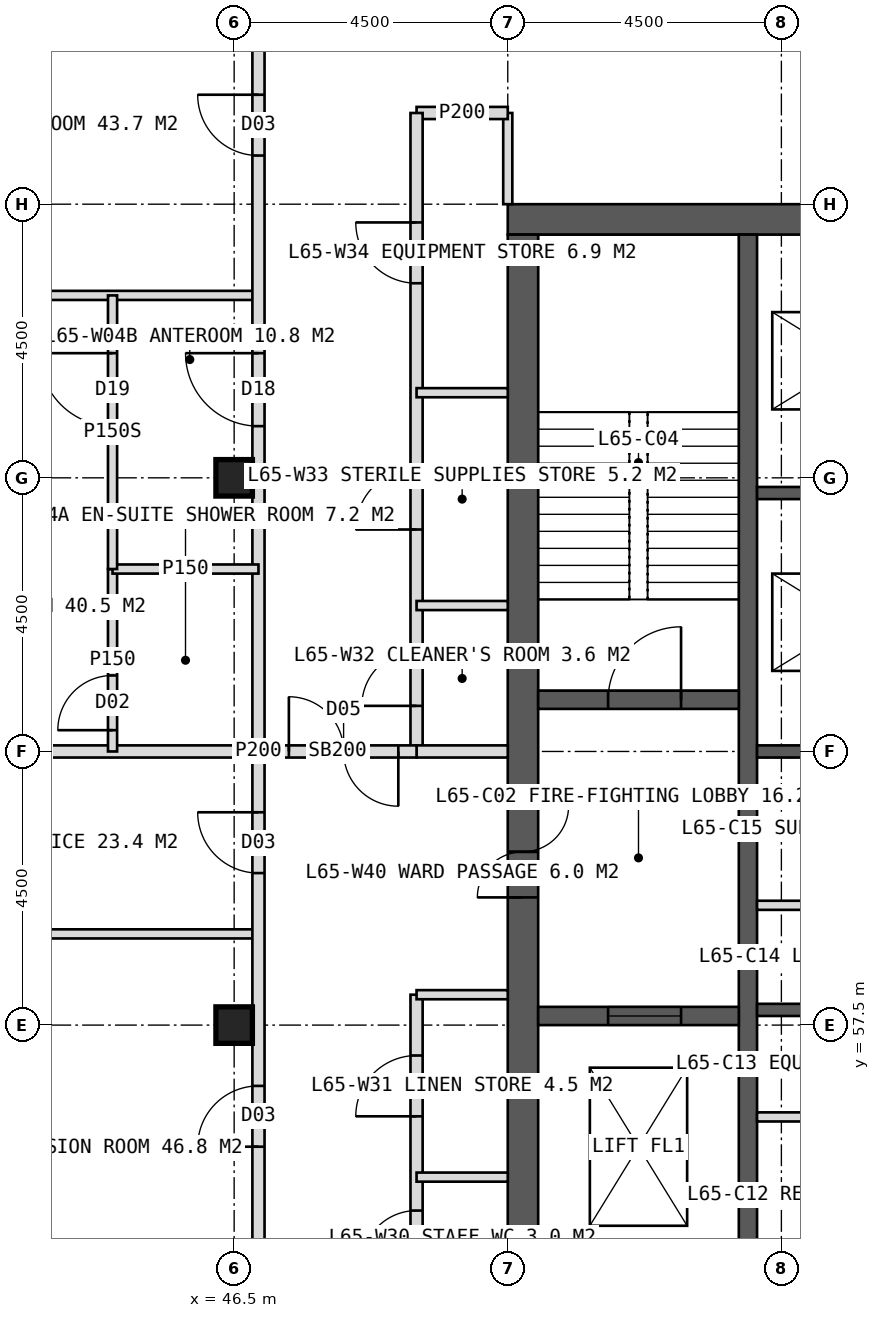
"""IFC4 building model, lengths in metres.
Left out: names, types, materials, properties, quantities, classifications, styles, units other than length and angle.
Written with IfcOpenShell. Run it as: python <this file> out.ifc"""

import sys

from ifc_helpers import new_model, si_unit, direction, frame, frame_2d, origin, origin_2d, place, context, subcontext, project, spatial, rectangle, hollow_rectangle, extrude, element, fill, save


model = new_model("IFC4")
c1 = context("Model", 3, precision=1e-05, world=origin(), true_north=direction((0.0, 1.0)))
c2 = subcontext(c1, "Body", "Model", "MODEL_VIEW")
j1 = project(units=[si_unit("LENGTHUNIT", "METRE"), si_unit("PLANEANGLEUNIT", "RADIAN")], contexts=[c1])
p1 = place(None, origin())
s1 = spatial("IfcSite", under=j1, at=p1, CompositionType="ELEMENT")
p2 = place(p1, origin())
s2 = spatial("IfcBuilding", under=s1, at=p2, CompositionType="ELEMENT")
p3 = place(p2, frame((0.0, 0.0, 270.0)))
s3 = spatial("IfcBuildingStorey", under=s2, at=p3, CompositionType="ELEMENT", Elevation=270.0)
p4 = place(p3, frame((51.0, 70.75, 0.0), z_axis=(0.0, 0.0, 1.0), x_axis=(1.0, 0.0, 0.0)))
e1 = element("IfcWall", 1, at=p4, inside=s3, PredefinedType="SHEAR", context=c2, shape_type="SweptSolid", body=[
    extrude(rectangle(XDim=18.0, YDim=0.5, at=frame_2d((9.0, 0.0))), origin(), (0.0, 0.0, 1.0), 4.0),
])
p5 = place(p4, frame((8.1, 0.0, 0.0)))
e2 = element("IfcOpeningElement", 2, at=p5, cuts=e1, PredefinedType="OPENING", context=c2, shape_type="SweptSolid", body=[
    extrude(rectangle(XDim=1.8, YDim=2.2, at=frame_2d((0.9, 1.1))), frame((0.0, 0.26, 0.0), z_axis=(0.0, -1.0, 0.0), x_axis=(1.0, 0.0, 0.0)), (0.0, 0.0, 1.0), 0.52),
])
p6 = place(p3, frame((51.25, 53.5, 0.0), z_axis=(0.0, 0.0, 1.0), x_axis=(0.0, 1.0, 0.0)))
e3 = element("IfcWall", 3, at=p6, inside=s3, PredefinedType="SHEAR", context=c2, shape_type="SweptSolid", body=[
    extrude(rectangle(XDim=17.0, YDim=0.5, at=frame_2d((8.5, 0.0))), origin(), (0.0, 0.0, 1.0), 4.0),
])
p7 = place(p6, frame((6.1, 0.0, 0.0)))
e4 = element("IfcOpeningElement", 4, at=p7, cuts=e3, PredefinedType="OPENING", context=c2, shape_type="SweptSolid", body=[
    extrude(rectangle(XDim=1.5, YDim=2.2, at=frame_2d((0.75, 1.1))), frame((0.0, 0.26, 0.0), z_axis=(0.0, -1.0, 0.0), x_axis=(1.0, 0.0, 0.0)), (0.0, 0.0, 1.0), 0.52),
])
p8 = place(p3, frame((54.95, 53.5, 0.0), z_axis=(0.0, 0.0, 1.0), x_axis=(0.0, 1.0, 0.0)))
e5 = element("IfcWall", 5, at=p8, inside=s3, PredefinedType="SHEAR", context=c2, shape_type="SweptSolid", body=[
    extrude(rectangle(XDim=17.0, YDim=0.3, at=frame_2d((8.5, 0.0))), origin(), (0.0, 0.0, 1.0), 4.0),
])
for number, where, z_axis, x_axis in (
    (6, (55.1, 57.75, 0.0), (0.0, 0.0, 1.0), (1.0, 0.0, 0.0)),
    (7, (55.1, 62.0, 0.0), (0.0, 0.0, 1.0), (1.0, 0.0, 0.0)),
    (8, (55.1, 66.25, 0.0), (0.0, 0.0, 1.0), (1.0, 0.0, 0.0)),
):
    element("IfcWall", number, at=place(p3, frame(where, z_axis=z_axis, x_axis=x_axis)), inside=s3, PredefinedType="SHEAR", context=c2, shape_type="SweptSolid", body=[
        extrude(rectangle(XDim=3.05, YDim=0.2, at=frame_2d((1.525, 0.0))), origin(), (0.0, 0.0, 1.0), 4.0),
    ])
p9 = place(p3, frame((51.5, 62.85, 0.0), z_axis=(0.0, 0.0, 1.0), x_axis=(1.0, 0.0, 0.0)))
e9 = element("IfcWall", 9, at=p9, inside=s3, PredefinedType="SHEAR", context=c2, shape_type="SweptSolid", body=[
    extrude(rectangle(XDim=3.3, YDim=0.3, at=frame_2d((1.65, 0.0))), origin(), (0.0, 0.0, 1.0), 4.0),
])
p10 = place(p9, frame((1.15, 0.0, 0.0)))
e10 = element("IfcOpeningElement", 10, at=p10, cuts=e9, PredefinedType="OPENING", context=c2, shape_type="SweptSolid", body=[
    extrude(rectangle(XDim=1.2, YDim=2.1, at=frame_2d((0.6, 1.05))), frame((0.0, 0.16, 0.0), z_axis=(0.0, -1.0, 0.0), x_axis=(1.0, 0.0, 0.0)), (0.0, 0.0, 1.0), 0.32),
])
p11 = place(p3, frame((51.5, 57.65, 0.0), z_axis=(0.0, 0.0, 1.0), x_axis=(1.0, 0.0, 0.0)))
e11 = element("IfcWall", 11, at=p11, inside=s3, PredefinedType="SHEAR", context=c2, shape_type="SweptSolid", body=[
    extrude(rectangle(XDim=3.3, YDim=0.3, at=frame_2d((1.65, 0.0))), origin(), (0.0, 0.0, 1.0), 4.0),
])
p12 = place(p11, frame((1.15, 0.0, 0.0)))
e12 = element("IfcOpeningElement", 12, at=p12, cuts=e11, PredefinedType="OPENING", context=c2, shape_type="SweptSolid", body=[
    extrude(rectangle(XDim=1.2, YDim=2.2, at=frame_2d((0.6, 1.1))), frame((0.0, 0.16, 0.0), z_axis=(0.0, -1.0, 0.0), x_axis=(1.0, 0.0, 0.0)), (0.0, 0.0, 1.0), 0.32),
])
for number, where, z_axis, x_axis in (
    (13, (46.5, 57.5, 0.0), (0.0, 0.0, 1.0), (1.0, 0.0, 0.0)),
    (14, (46.5, 66.5, 0.0), (0.0, 0.0, 1.0), (1.0, 0.0, 0.0)),
):
    element("IfcColumn", number, at=place(p3, frame(where, z_axis=z_axis, x_axis=x_axis)), inside=s3, PredefinedType="COLUMN", context=c2, shape_type="SweptSolid", body=[
        extrude(hollow_rectangle(XDim=0.6, YDim=0.6, WallThickness=0.04, at=origin_2d()), origin(), (0.0, 0.0, 1.0), 4.0),
    ])
p13 = place(p3, frame((51.0, 71.0, 0.0), z_axis=(0.0, 0.0, 1.0), x_axis=(0.0, 1.0, 0.0)))
e15 = element("IfcWall", 15, at=p13, inside=s3, PredefinedType="PARTITIONING", context=c2, shape_type="SweptSolid", body=[
    extrude(rectangle(XDim=1.5, YDim=0.15, at=frame_2d((0.75, 0.0))), origin(), (0.0, 0.0, 1.0), 3.75),
])
p14 = place(p3, frame((49.5, 72.5, 0.0), z_axis=(0.0, 0.0, 1.0), x_axis=(1.0, 0.0, 0.0)))
e16 = element("IfcWall", 16, at=p14, inside=s3, PredefinedType="PARTITIONING", context=c2, shape_type="SweptSolid", body=[
    extrude(rectangle(XDim=1.5, YDim=0.2, at=frame_2d((0.75, 0.0))), origin(), (0.0, 0.0, 1.0), 3.75),
])
p15 = place(p3, frame((46.9, 59.0, 0.0), z_axis=(0.0, 0.0, 1.0), x_axis=(-1.0, 0.0, 0.0)))
e17 = element("IfcWall", 17, at=p15, inside=s3, PredefinedType="PARTITIONING", context=c2, shape_type="SweptSolid", body=[
    extrude(rectangle(XDim=7.8, YDim=0.15, at=frame_2d((3.9, 0.0))), origin(), (0.0, 0.0, 1.0), 3.75),
])
p16 = place(p3, frame((46.9, 62.0, 0.0), z_axis=(0.0, 0.0, 1.0), x_axis=(-1.0, 0.0, 0.0)))
e18 = element("IfcWall", 18, at=p16, inside=s3, PredefinedType="SOLIDWALL", context=c2, shape_type="SweptSolid", body=[
    extrude(rectangle(XDim=7.8, YDim=0.2, at=frame_2d((3.9, 0.0))), origin(), (0.0, 0.0, 1.0), 2.75),
])
p17 = place(p3, frame((46.9, 69.5, 0.0), z_axis=(0.0, 0.0, 1.0), x_axis=(-1.0, 0.0, 0.0)))
e19 = element("IfcWall", 19, at=p17, inside=s3, PredefinedType="PARTITIONING", context=c2, shape_type="SweptSolid", body=[
    extrude(rectangle(XDim=7.8, YDim=0.15, at=frame_2d((3.9, 0.0))), origin(), (0.0, 0.0, 1.0), 3.75),
])
p18 = place(p3, frame((46.9, 48.9, 0.0), z_axis=(0.0, 0.0, 1.0), x_axis=(0.0, 1.0, 0.0)))
e20 = element("IfcWall", 20, at=p18, inside=s3, PredefinedType="PARTITIONING", context=c2, shape_type="SweptSolid", body=[
    extrude(rectangle(XDim=26.2, YDim=0.2, at=frame_2d((13.1, 0.0))), origin(), (0.0, 0.0, 1.0), 3.75),
])
p19 = place(p18, frame((1.55, 0.0, 0.0)))
e21 = element("IfcOpeningElement", 21, at=p19, cuts=e20, PredefinedType="OPENING", context=c2, shape_type="SweptSolid", body=[
    extrude(rectangle(XDim=1.0, YDim=2.1, at=frame_2d((0.5, 1.05))), frame((0.0, 0.11, 0.0), z_axis=(0.0, -1.0, 0.0), x_axis=(1.0, 0.0, 0.0)), (0.0, 0.0, 1.0), 0.22),
])
p20 = place(p18, frame((6.6, 0.0, 0.0)))
e22 = element("IfcOpeningElement", 22, at=p20, cuts=e20, PredefinedType="OPENING", context=c2, shape_type="SweptSolid", body=[
    extrude(rectangle(XDim=1.0, YDim=2.1, at=frame_2d((0.5, 1.05))), frame((0.0, 0.11, 0.0), z_axis=(0.0, -1.0, 0.0), x_axis=(1.0, 0.0, 0.0)), (0.0, 0.0, 1.0), 0.22),
])
p21 = place(p18, frame((11.1, 0.0, 0.0)))
e23 = element("IfcOpeningElement", 23, at=p21, cuts=e20, PredefinedType="OPENING", context=c2, shape_type="SweptSolid", body=[
    extrude(rectangle(XDim=1.0, YDim=2.1, at=frame_2d((0.5, 1.05))), frame((0.0, 0.11, 0.0), z_axis=(0.0, -1.0, 0.0), x_axis=(1.0, 0.0, 0.0)), (0.0, 0.0, 1.0), 0.22),
])
p22 = place(p18, frame((18.45, 0.0, 0.0)))
e24 = element("IfcOpeningElement", 24, at=p22, cuts=e20, PredefinedType="OPENING", context=c2, shape_type="SweptSolid", body=[
    extrude(rectangle(XDim=1.2, YDim=2.2, at=frame_2d((0.6, 1.1))), frame((0.0, 0.11, 0.0), z_axis=(0.0, -1.0, 0.0), x_axis=(1.0, 0.0, 0.0)), (0.0, 0.0, 1.0), 0.22),
])
p23 = place(p18, frame((22.9, 0.0, 0.0)))
e25 = element("IfcOpeningElement", 25, at=p23, cuts=e20, PredefinedType="OPENING", context=c2, shape_type="SweptSolid", body=[
    extrude(rectangle(XDim=1.0, YDim=2.1, at=frame_2d((0.5, 1.05))), frame((0.0, 0.11, 0.0), z_axis=(0.0, -1.0, 0.0), x_axis=(1.0, 0.0, 0.0)), (0.0, 0.0, 1.0), 0.22),
])
p24 = place(p3, frame((44.5, 62.0, 0.0), z_axis=(0.0, 0.0, 1.0), x_axis=(0.0, 1.0, 0.0)))
e26 = element("IfcWall", 26, at=p24, inside=s3, PredefinedType="PARTITIONING", context=c2, shape_type="SweptSolid", body=[
    extrude(rectangle(XDim=3.0, YDim=0.15, at=frame_2d((1.5, 0.0))), origin(), (0.0, 0.0, 1.0), 3.75),
])
p25 = place(p24, frame((0.35, 0.0, 0.0)))
e27 = element("IfcOpeningElement", 27, at=p25, cuts=e26, PredefinedType="OPENING", context=c2, shape_type="SweptSolid", body=[
    extrude(rectangle(XDim=0.9, YDim=2.1, at=frame_2d((0.45, 1.05))), frame((0.0, 0.085, 0.0), z_axis=(0.0, -1.0, 0.0), x_axis=(1.0, 0.0, 0.0)), (0.0, 0.0, 1.0), 0.17),
])
p26 = place(p3, frame((46.9, 65.0, 0.0), z_axis=(0.0, 0.0, 1.0), x_axis=(-1.0, 0.0, 0.0)))
e28 = element("IfcWall", 28, at=p26, inside=s3, PredefinedType="PARTITIONING", context=c2, shape_type="SweptSolid", body=[
    extrude(rectangle(XDim=2.4, YDim=0.15, at=frame_2d((1.2, 0.0))), origin(), (0.0, 0.0, 1.0), 3.75),
])
p27 = place(p3, frame((44.5, 65.0, 0.0), z_axis=(0.0, 0.0, 1.0), x_axis=(0.0, 1.0, 0.0)))
e29 = element("IfcWall", 29, at=p27, inside=s3, PredefinedType="PARTITIONING", context=c2, shape_type="SweptSolid", body=[
    extrude(rectangle(XDim=4.5, YDim=0.15, at=frame_2d((2.25, 0.0))), origin(), (0.0, 0.0, 1.0), 3.75),
])
p28 = place(p27, frame((2.35, 0.0, 0.0)))
e30 = element("IfcOpeningElement", 30, at=p28, cuts=e29, PredefinedType="OPENING", context=c2, shape_type="SweptSolid", body=[
    extrude(rectangle(XDim=1.2, YDim=2.2, at=frame_2d((0.6, 1.1))), frame((0.0, 0.085, 0.0), z_axis=(0.0, -1.0, 0.0), x_axis=(1.0, 0.0, 0.0)), (0.0, 0.0, 1.0), 0.17),
])
p29 = place(p3, frame((49.5, 53.0, 0.0), z_axis=(0.0, 0.0, 1.0), x_axis=(0.0, 1.0, 0.0)))
e31 = element("IfcWall", 31, at=p29, inside=s3, PredefinedType="PARTITIONING", context=c2, shape_type="SweptSolid", body=[
    extrude(rectangle(XDim=5.0, YDim=0.2, at=frame_2d((2.5, 0.0))), origin(), (0.0, 0.0, 1.0), 3.75),
])
p30 = place(p29, frame((0.55, 0.0, 0.0)))
e32 = element("IfcOpeningElement", 32, at=p30, cuts=e31, PredefinedType="OPENING", context=c2, shape_type="SweptSolid", body=[
    extrude(rectangle(XDim=0.9, YDim=2.1, at=frame_2d((0.45, 1.05))), frame((0.0, 0.11, 0.0), z_axis=(0.0, -1.0, 0.0), x_axis=(1.0, 0.0, 0.0)), (0.0, 0.0, 1.0), 0.22),
])
p31 = place(p29, frame((3.0, 0.0, 0.0)))
e33 = element("IfcOpeningElement", 33, at=p31, cuts=e31, PredefinedType="OPENING", context=c2, shape_type="SweptSolid", body=[
    extrude(rectangle(XDim=1.0, YDim=2.1, at=frame_2d((0.5, 1.05))), frame((0.0, 0.11, 0.0), z_axis=(0.0, -1.0, 0.0), x_axis=(1.0, 0.0, 0.0)), (0.0, 0.0, 1.0), 0.22),
])
p32 = place(p3, frame((49.5, 62.0, 0.0), z_axis=(0.0, 0.0, 1.0), x_axis=(0.0, 1.0, 0.0)))
e34 = element("IfcWall", 34, at=p32, inside=s3, PredefinedType="PARTITIONING", context=c2, shape_type="SweptSolid", body=[
    extrude(rectangle(XDim=10.5, YDim=0.2, at=frame_2d((5.25, 0.0))), origin(), (0.0, 0.0, 1.0), 3.75),
])
p33 = place(p32, frame((0.75, 0.0, 0.0)))
e35 = element("IfcOpeningElement", 35, at=p33, cuts=e34, PredefinedType="OPENING", context=c2, shape_type="SweptSolid", body=[
    extrude(rectangle(XDim=0.9, YDim=2.1, at=frame_2d((0.45, 1.05))), frame((0.0, 0.11, 0.0), z_axis=(0.0, -1.0, 0.0), x_axis=(1.0, 0.0, 0.0)), (0.0, 0.0, 1.0), 0.22),
])
p34 = place(p32, frame((3.65, 0.0, 0.0)))
e36 = element("IfcOpeningElement", 36, at=p34, cuts=e34, PredefinedType="OPENING", context=c2, shape_type="SweptSolid", body=[
    extrude(rectangle(XDim=1.0, YDim=2.1, at=frame_2d((0.5, 1.05))), frame((0.0, 0.11, 0.0), z_axis=(0.0, -1.0, 0.0), x_axis=(1.0, 0.0, 0.0)), (0.0, 0.0, 1.0), 0.22),
])
p35 = place(p32, frame((7.7, 0.0, 0.0)))
e37 = element("IfcOpeningElement", 37, at=p35, cuts=e34, PredefinedType="OPENING", context=c2, shape_type="SweptSolid", body=[
    extrude(rectangle(XDim=1.0, YDim=2.1, at=frame_2d((0.5, 1.05))), frame((0.0, 0.11, 0.0), z_axis=(0.0, -1.0, 0.0), x_axis=(1.0, 0.0, 0.0)), (0.0, 0.0, 1.0), 0.22),
])
p36 = place(p3, frame((51.0, 58.0, 0.0), z_axis=(0.0, 0.0, 1.0), x_axis=(-1.0, 0.0, 0.0)))
e38 = element("IfcWall", 38, at=p36, inside=s3, PredefinedType="PARTITIONING", context=c2, shape_type="SweptSolid", body=[
    extrude(rectangle(XDim=1.5, YDim=0.15, at=frame_2d((0.75, 0.0))), origin(), (0.0, 0.0, 1.0), 3.75),
])
p37 = place(p3, frame((51.0, 62.0, 0.0), z_axis=(0.0, 0.0, 1.0), x_axis=(-1.0, 0.0, 0.0)))
e39 = element("IfcWall", 39, at=p37, inside=s3, PredefinedType="SOLIDWALL", context=c2, shape_type="SweptSolid", body=[
    extrude(rectangle(XDim=1.5, YDim=0.2, at=frame_2d((0.75, 0.0))), origin(), (0.0, 0.0, 1.0), 2.75),
])
for number, where, z_axis, x_axis in (
    (40, (51.0, 55.0, 0.0), (0.0, 0.0, 1.0), (-1.0, 0.0, 0.0)),
    (41, (51.0, 64.4, 0.0), (0.0, 0.0, 1.0), (-1.0, 0.0, 0.0)),
    (42, (51.0, 67.9, 0.0), (0.0, 0.0, 1.0), (-1.0, 0.0, 0.0)),
):
    element("IfcWall", number, at=place(p3, frame(where, z_axis=z_axis, x_axis=x_axis)), inside=s3, PredefinedType="PARTITIONING", context=c2, shape_type="SweptSolid", body=[
        extrude(rectangle(XDim=1.5, YDim=0.15, at=frame_2d((0.75, 0.0))), origin(), (0.0, 0.0, 1.0), 3.75),
    ])
p38 = place(p3, frame((49.5, 62.0, 0.0), z_axis=(0.0, 0.0, 1.0), x_axis=(-1.0, 0.0, 0.0)))
e43 = element("IfcWall", 43, at=p38, inside=s3, PredefinedType="SOLIDWALL", context=c2, shape_type="SweptSolid", body=[
    extrude(rectangle(XDim=2.6, YDim=0.2, at=frame_2d((1.3, 0.0))), origin(), (0.0, 0.0, 1.0), 2.75),
])
p39 = place(p38, frame((0.3, 0.0, 0.0)))
e44 = element("IfcOpeningElement", 44, at=p39, cuts=e43, PredefinedType="OPENING", context=c2, shape_type="SweptSolid", body=[
    extrude(rectangle(XDim=1.8, YDim=2.2, at=frame_2d((0.9, 1.1))), frame((0.0, 0.11, 0.0), z_axis=(0.0, -1.0, 0.0), x_axis=(1.0, 0.0, 0.0)), (0.0, 0.0, 1.0), 0.22),
])
for number, where, z_axis, x_axis in (
    (45, (55.1, 55.99, 0.0), (0.0, 0.0, 1.0), (1.0, 0.0, 0.0)),
    (46, (55.1, 59.47, 0.0), (0.0, 0.0, 1.0), (1.0, 0.0, 0.0)),
):
    element("IfcWall", number, at=place(p3, frame(where, z_axis=z_axis, x_axis=x_axis)), inside=s3, PredefinedType="PARTITIONING", context=c2, shape_type="SweptSolid", body=[
        extrude(rectangle(XDim=3.05, YDim=0.15, at=frame_2d((1.525, 0.0))), origin(), (0.0, 0.0, 1.0), 3.75),
    ])
p40 = place(p20, origin())
e47 = element("IfcDoor", 47, at=p40, inside=s3, OperationType="SINGLE_SWING_LEFT", PredefinedType="DOOR", context=c2, shape_type="SweptSolid", body=[
    extrude(rectangle(XDim=1.0, YDim=2.1, at=frame_2d((0.5, 1.05))), frame((0.0, 0.025, 0.0), z_axis=(0.0, -1.0, 0.0), x_axis=(1.0, 0.0, 0.0)), (0.0, 0.0, 1.0), 0.05),
])
fill(e22, e47)
p41 = place(p21, origin())
e48 = element("IfcDoor", 48, at=p41, inside=s3, OperationType="SINGLE_SWING_RIGHT", PredefinedType="DOOR", context=c2, shape_type="SweptSolid", body=[
    extrude(rectangle(XDim=1.0, YDim=2.1, at=frame_2d((0.5, 1.05))), frame((0.0, 0.025, 0.0), z_axis=(0.0, -1.0, 0.0), x_axis=(1.0, 0.0, 0.0)), (0.0, 0.0, 1.0), 0.05),
])
fill(e23, e48)
p42 = place(p28, origin())
e49 = element("IfcDoor", 49, at=p42, inside=s3, OperationType="SINGLE_SWING_RIGHT", PredefinedType="DOOR", context=c2, shape_type="SweptSolid", body=[
    extrude(rectangle(XDim=1.2, YDim=2.2, at=frame_2d((0.6, 1.1))), frame((0.0, 0.025, 0.0), z_axis=(0.0, -1.0, 0.0), x_axis=(1.0, 0.0, 0.0)), (0.0, 0.0, 1.0), 0.05),
])
fill(e30, e49)
p43 = place(p22, origin())
e50 = element("IfcDoor", 50, at=p43, inside=s3, OperationType="SINGLE_SWING_RIGHT", PredefinedType="DOOR", context=c2, shape_type="SweptSolid", body=[
    extrude(rectangle(XDim=1.2, YDim=2.2, at=frame_2d((0.6, 1.1))), frame((0.0, 0.025, 0.0), z_axis=(0.0, -1.0, 0.0), x_axis=(1.0, 0.0, 0.0)), (0.0, 0.0, 1.0), 0.05),
])
fill(e24, e50)
p44 = place(p25, origin())
e51 = element("IfcDoor", 51, at=p44, inside=s3, OperationType="SINGLE_SWING_LEFT", PredefinedType="DOOR", context=c2, shape_type="SweptSolid", body=[
    extrude(rectangle(XDim=0.9, YDim=2.1, at=frame_2d((0.45, 1.05))), frame((0.0, 0.025, 0.0), z_axis=(0.0, -1.0, 0.0), x_axis=(1.0, 0.0, 0.0)), (0.0, 0.0, 1.0), 0.05),
])
fill(e27, e51)
p45 = place(p23, origin())
e52 = element("IfcDoor", 52, at=p45, inside=s3, OperationType="SINGLE_SWING_RIGHT", PredefinedType="DOOR", context=c2, shape_type="SweptSolid", body=[
    extrude(rectangle(XDim=1.0, YDim=2.1, at=frame_2d((0.5, 1.05))), frame((0.0, 0.025, 0.0), z_axis=(0.0, -1.0, 0.0), x_axis=(1.0, 0.0, 0.0)), (0.0, 0.0, 1.0), 0.05),
])
fill(e25, e52)
p46 = place(p30, origin())
e53 = element("IfcDoor", 53, at=p46, inside=s3, OperationType="SINGLE_SWING_LEFT", PredefinedType="DOOR", context=c2, shape_type="SweptSolid", body=[
    extrude(rectangle(XDim=0.9, YDim=2.1, at=frame_2d((0.45, 1.05))), frame((0.0, 0.025, 0.0), z_axis=(0.0, -1.0, 0.0), x_axis=(1.0, 0.0, 0.0)), (0.0, 0.0, 1.0), 0.05),
])
fill(e32, e53)
p47 = place(p31, origin())
e54 = element("IfcDoor", 54, at=p47, inside=s3, OperationType="SINGLE_SWING_LEFT", PredefinedType="DOOR", context=c2, shape_type="SweptSolid", body=[
    extrude(rectangle(XDim=1.0, YDim=2.1, at=frame_2d((0.5, 1.05))), frame((0.0, 0.025, 0.0), z_axis=(0.0, -1.0, 0.0), x_axis=(1.0, 0.0, 0.0)), (0.0, 0.0, 1.0), 0.05),
])
fill(e33, e54)
p48 = place(p33, origin())
e55 = element("IfcDoor", 55, at=p48, inside=s3, OperationType="SINGLE_SWING_LEFT", PredefinedType="DOOR", context=c2, shape_type="SweptSolid", body=[
    extrude(rectangle(XDim=0.9, YDim=2.1, at=frame_2d((0.45, 1.05))), frame((0.0, 0.025, 0.0), z_axis=(0.0, -1.0, 0.0), x_axis=(1.0, 0.0, 0.0)), (0.0, 0.0, 1.0), 0.05),
])
fill(e35, e55)
p49 = place(p34, origin())
e56 = element("IfcDoor", 56, at=p49, inside=s3, OperationType="SINGLE_SWING_LEFT", PredefinedType="DOOR", context=c2, shape_type="SweptSolid", body=[
    extrude(rectangle(XDim=1.0, YDim=2.1, at=frame_2d((0.5, 1.05))), frame((0.0, 0.025, 0.0), z_axis=(0.0, -1.0, 0.0), x_axis=(1.0, 0.0, 0.0)), (0.0, 0.0, 1.0), 0.05),
])
fill(e36, e56)
p50 = place(p35, origin())
e57 = element("IfcDoor", 57, at=p50, inside=s3, OperationType="SINGLE_SWING_RIGHT", PredefinedType="DOOR", context=c2, shape_type="SweptSolid", body=[
    extrude(rectangle(XDim=1.0, YDim=2.1, at=frame_2d((0.5, 1.05))), frame((0.0, 0.025, 0.0), z_axis=(0.0, -1.0, 0.0), x_axis=(1.0, 0.0, 0.0)), (0.0, 0.0, 1.0), 0.05),
])
fill(e37, e57)
p51 = place(p39, origin())
e58 = element("IfcDoor", 58, at=p51, inside=s3, OperationType="DOUBLE_DOOR_DOUBLE_SWING", PredefinedType="DOOR", context=c2, shape_type="SweptSolid", body=[
    extrude(rectangle(XDim=1.8, YDim=2.2, at=frame_2d((0.9, 1.1))), frame((0.0, 0.025, 0.0), z_axis=(0.0, -1.0, 0.0), x_axis=(1.0, 0.0, 0.0)), (0.0, 0.0, 1.0), 0.05),
])
fill(e44, e58)
p52 = place(p7, origin())
e59 = element("IfcDoor", 59, at=p52, inside=s3, OperationType="DOUBLE_DOOR_SINGLE_SWING", PredefinedType="DOOR", context=c2, shape_type="SweptSolid", body=[
    extrude(rectangle(XDim=1.5, YDim=2.2, at=frame_2d((0.75, 1.1))), frame((0.0, 0.025, 0.0), z_axis=(0.0, -1.0, 0.0), x_axis=(1.0, 0.0, 0.0)), (0.0, 0.0, 1.0), 0.05),
])
fill(e4, e59)
p53 = place(p10, origin())
e60 = element("IfcDoor", 60, at=p53, inside=s3, OperationType="SINGLE_SWING_RIGHT", PredefinedType="DOOR", context=c2, shape_type="SweptSolid", body=[
    extrude(rectangle(XDim=1.2, YDim=2.1, at=frame_2d((0.6, 1.05))), frame((0.0, 0.025, 0.0), z_axis=(0.0, -1.0, 0.0), x_axis=(1.0, 0.0, 0.0)), (0.0, 0.0, 1.0), 0.05),
])
fill(e10, e60)
p54 = place(p12, origin())
e61 = element("IfcDoor", 61, at=p54, inside=s3, OperationType="SLIDING_TO_LEFT", PredefinedType="DOOR", context=c2, shape_type="SweptSolid", body=[
    extrude(rectangle(XDim=1.2, YDim=2.2, at=frame_2d((0.6, 1.1))), frame((0.0, 0.025, 0.0), z_axis=(0.0, -1.0, 0.0), x_axis=(1.0, 0.0, 0.0)), (0.0, 0.0, 1.0), 0.05),
])
fill(e12, e61)
save(model, sys.argv[1])
